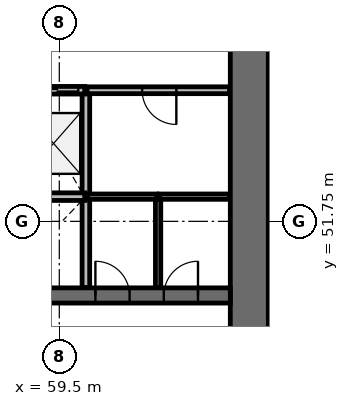
"""IFC4 building model, lengths in metres.
Left out: names, types, materials, properties, quantities, classifications, styles, units other than length and angle.
Written with IfcOpenShell. Run it as: python <this file> out.ifc"""

import sys

from ifc_helpers import new_model, si_unit, direction, frame, frame_2d, origin, place, context, subcontext, project, spatial, rectangle, extrude, source, transform, mapped, element, fill, save


model = new_model("IFC4")
c1 = context("Model", 3, precision=1e-05, world=origin(), true_north=direction((0.0, 1.0)))
c2 = subcontext(c1, "Body", "Model", "MODEL_VIEW")
j1 = project(units=[si_unit("LENGTHUNIT", "METRE"), si_unit("PLANEANGLEUNIT", "RADIAN")], contexts=[c1])
p1 = place(None, origin())
s1 = spatial("IfcSite", under=j1, at=p1, CompositionType="ELEMENT")
p2 = place(p1, origin())
s2 = spatial("IfcBuilding", under=s1, at=p2, CompositionType="ELEMENT")
p3 = place(p2, frame((0.0, 0.0, 9.4)))
s3 = spatial("IfcBuildingStorey", under=s2, at=p3, CompositionType="ELEMENT", Elevation=9.4)
p4 = place(p3, frame((64.5, 38.0, 0.0), z_axis=(0.0, 0.0, 1.0), x_axis=(0.0, 1.0, 0.0)))
e1 = element("IfcWall", 1, at=p4, inside=s3, PredefinedType="SHEAR", context=c2, shape_type="SweptSolid", body=[
    extrude(rectangle(XDim=20.0, YDim=1.0, at=frame_2d((10.0, 0.0))), origin(), (0.0, 0.0, 1.0), 4.4),
])
p5 = place(p4, frame((9.1, 0.0, 0.0)))
e2 = element("IfcOpeningElement", 2, at=p5, cuts=e1, PredefinedType="OPENING", context=c2, shape_type="SweptSolid", body=[
    extrude(rectangle(XDim=1.8, YDim=2.1, at=frame_2d((0.9, 1.05))), frame((0.0, 0.51, 0.0), z_axis=(0.0, -1.0, 0.0), x_axis=(1.0, 0.0, 0.0)), (0.0, 0.0, 1.0), 1.02),
])
p6 = place(p3, frame((40.0, 49.8, 0.0), z_axis=(0.0, 0.0, 1.0), x_axis=(1.0, 0.0, 0.0)))
e3 = element("IfcWall", 3, at=p6, inside=s3, PredefinedType="SHEAR", context=c2, shape_type="SweptSolid", body=[
    extrude(rectangle(XDim=24.0, YDim=0.4, at=frame_2d((12.0, 0.0))), origin(), (0.0, 0.0, 1.0), 4.4),
])
p7 = place(p6, frame((4.5, 0.0, 0.0)))
e4 = element("IfcOpeningElement", 4, at=p7, cuts=e3, PredefinedType="OPENING", context=c2, shape_type="SweptSolid", body=[
    extrude(rectangle(XDim=1.1, YDim=2.1, at=frame_2d((0.55, 1.05))), frame((0.0, 0.21, 0.0), z_axis=(0.0, -1.0, 0.0), x_axis=(1.0, 0.0, 0.0)), (0.0, 0.0, 1.0), 0.42),
])
p8 = place(p6, frame((7.0, 0.0, 0.0)))
e5 = element("IfcOpeningElement", 5, at=p8, cuts=e3, PredefinedType="OPENING", context=c2, shape_type="SweptSolid", body=[
    extrude(rectangle(XDim=1.1, YDim=2.1, at=frame_2d((0.55, 1.05))), frame((0.0, 0.21, 0.0), z_axis=(0.0, -1.0, 0.0), x_axis=(1.0, 0.0, 0.0)), (0.0, 0.0, 1.0), 0.42),
])
p9 = place(p6, frame((9.5, 0.0, 0.0)))
e6 = element("IfcOpeningElement", 6, at=p9, cuts=e3, PredefinedType="OPENING", context=c2, shape_type="SweptSolid", body=[
    extrude(rectangle(XDim=1.1, YDim=2.1, at=frame_2d((0.55, 1.05))), frame((0.0, 0.21, 0.0), z_axis=(0.0, -1.0, 0.0), x_axis=(1.0, 0.0, 0.0)), (0.0, 0.0, 1.0), 0.42),
])
p10 = place(p6, frame((0.9, 0.0, 0.0)))
e7 = element("IfcOpeningElement", 7, at=p10, cuts=e3, PredefinedType="OPENING", context=c2, shape_type="SweptSolid", body=[
    extrude(rectangle(XDim=1.8, YDim=2.4, at=frame_2d((0.9, 1.2))), frame((0.0, 0.21, 0.0), z_axis=(0.0, -1.0, 0.0), x_axis=(1.0, 0.0, 0.0)), (0.0, 0.0, 1.0), 0.42),
])
p11 = place(p6, frame((20.45, 0.0, 0.0)))
e8 = element("IfcOpeningElement", 8, at=p11, cuts=e3, PredefinedType="OPENING", context=c2, shape_type="SweptSolid", body=[
    extrude(rectangle(XDim=0.9, YDim=2.1, at=frame_2d((0.45, 1.05))), frame((0.0, 0.21, 0.0), z_axis=(0.0, -1.0, 0.0), x_axis=(1.0, 0.0, 0.0)), (0.0, 0.0, 1.0), 0.42),
])
p12 = place(p6, frame((22.25, 0.0, 0.0)))
e9 = element("IfcOpeningElement", 9, at=p12, cuts=e3, PredefinedType="OPENING", context=c2, shape_type="SweptSolid", body=[
    extrude(rectangle(XDim=0.9, YDim=2.1, at=frame_2d((0.45, 1.05))), frame((0.0, 0.21, 0.0), z_axis=(0.0, -1.0, 0.0), x_axis=(1.0, 0.0, 0.0)), (0.0, 0.0, 1.0), 0.42),
])
p13 = place(p6, frame((11.65, 0.0, 0.0)))
e10 = element("IfcOpeningElement", 10, at=p13, cuts=e3, PredefinedType="OPENING", context=c2, shape_type="SweptSolid", body=[
    extrude(rectangle(XDim=0.9, YDim=2.1, at=frame_2d((0.45, 1.05))), frame((0.0, 0.21, 0.0), z_axis=(0.0, -1.0, 0.0), x_axis=(1.0, 0.0, 0.0)), (0.0, 0.0, 1.0), 0.42),
])
p14 = place(p3, frame((60.2, 52.4, 0.0), z_axis=(0.0, 0.0, 1.0), x_axis=(0.0, 1.0, 0.0)))
e11 = element("IfcWall", 11, at=p14, inside=s3, PredefinedType="SOLIDWALL", context=c2, shape_type="SweptSolid", body=[
    extrude(rectangle(XDim=2.8, YDim=0.2, at=frame_2d((1.4, 0.0))), origin(), (0.0, 0.0, 1.0), 3.95),
])
p15 = place(p3, frame((60.2, 50.01, 0.0), z_axis=(0.0, 0.0, 1.0), x_axis=(0.0, 1.0, 0.0)))
e12 = element("IfcWall", 12, at=p15, inside=s3, PredefinedType="SOLIDWALL", context=c2, shape_type="SweptSolid", body=[
    extrude(rectangle(XDim=2.36, YDim=0.2, at=frame_2d((1.18, 0.0))), origin(), (0.0, 0.0, 1.0), 3.95),
])
p16 = place(p3, frame((60.17, 52.4, 0.0), z_axis=(0.0, 0.0, 1.0), x_axis=(-1.0, 0.0, 0.0)))
e13 = element("IfcWall", 13, at=p16, inside=s3, PredefinedType="SOLIDWALL", context=c2, shape_type="SweptSolid", body=[
    extrude(rectangle(XDim=1.64, YDim=0.2, at=frame_2d((0.82, 0.0))), origin(), (0.0, 0.0, 1.0), 3.95),
])
p17 = place(p3, frame((60.17, 55.2, 0.0), z_axis=(0.0, 0.0, 1.0), x_axis=(-1.0, 0.0, 0.0)))
e14 = element("IfcWall", 14, at=p17, inside=s3, PredefinedType="SOLIDWALL", context=c2, shape_type="SweptSolid", body=[
    extrude(rectangle(XDim=1.64, YDim=0.2, at=frame_2d((0.82, 0.0))), origin(), (0.0, 0.0, 1.0), 3.95),
])
p18 = place(p17, frame((0.17, 0.0, 0.0)))
e15 = element("IfcOpeningElement", 15, at=p18, cuts=e14, PredefinedType="OPENING", context=c2, shape_type="SweptSolid", body=[
    extrude(rectangle(XDim=1.1, YDim=2.1, at=frame_2d((0.55, 1.05))), frame((0.0, 0.11, 0.0), z_axis=(0.0, -1.0, 0.0), x_axis=(1.0, 0.0, 0.0)), (0.0, 0.0, 1.0), 0.22),
])
p19 = place(p3, frame((63.98, 55.2, 0.0), z_axis=(0.0, 0.0, 1.0), x_axis=(-1.0, 0.0, 0.0)))
e16 = element("IfcWall", 16, at=p19, inside=s3, PredefinedType="PARTITIONING", context=c2, shape_type="SweptSolid", body=[
    extrude(rectangle(XDim=3.75, YDim=0.18, at=frame_2d((1.875, 0.0))), origin(), (0.0, 0.0, 1.0), 3.95),
])
p20 = place(p19, frame((1.4, 0.0, 0.0)))
e17 = element("IfcOpeningElement", 17, at=p20, cuts=e16, PredefinedType="OPENING", context=c2, shape_type="SweptSolid", body=[
    extrude(rectangle(XDim=0.9, YDim=2.1, at=frame_2d((0.45, 1.05))), frame((0.0, 0.1, 0.0), z_axis=(0.0, -1.0, 0.0), x_axis=(1.0, 0.0, 0.0)), (0.0, 0.0, 1.0), 0.2),
])
p21 = place(p3, frame((62.1, 50.01, 0.0), z_axis=(0.0, 0.0, 1.0), x_axis=(0.0, 1.0, 0.0)))
e18 = element("IfcWall", 18, at=p21, inside=s3, PredefinedType="PARTITIONING", context=c2, shape_type="SweptSolid", body=[
    extrude(rectangle(XDim=2.39, YDim=0.14, at=frame_2d((1.195, 0.0))), origin(), (0.0, 0.0, 1.0), 3.15),
])
p22 = place(p3, frame((62.07, 52.4, 0.0), z_axis=(0.0, 0.0, 1.0), x_axis=(-1.0, 0.0, 0.0)))
e19 = element("IfcWall", 19, at=p22, inside=s3, PredefinedType="PARTITIONING", context=c2, shape_type="SweptSolid", body=[
    extrude(rectangle(XDim=1.84, YDim=0.14, at=frame_2d((0.92, 0.0))), origin(), (0.0, 0.0, 1.0), 3.15),
])
p23 = place(p3, frame((63.98, 52.4, 0.0), z_axis=(0.0, 0.0, 1.0), x_axis=(-1.0, 0.0, 0.0)))
e20 = element("IfcWall", 20, at=p23, inside=s3, PredefinedType="PARTITIONING", context=c2, shape_type="SweptSolid", body=[
    extrude(rectangle(XDim=1.85, YDim=0.14, at=frame_2d((0.925, 0.0))), origin(), (0.0, 0.0, 1.0), 3.15),
])
m1 = source(origin(), c2, "Body", "SweptSolid", [
    extrude(rectangle(XDim=1.1, YDim=2.1, at=frame_2d((0.55, 1.05))), frame((0.0, 0.025, 0.0), z_axis=(0.0, -1.0, 0.0), x_axis=(1.0, 0.0, 0.0)), (0.0, 0.0, 1.0), 0.05),
])
p24 = place(p18, origin())
e21 = element("IfcDoor", 21, at=p24, inside=s3, OperationType="DOUBLE_DOOR_SLIDING", PredefinedType="USERDEFINED", context=c2, shape_type="MappedRepresentation", body=[
    mapped(m1, transform((0.0, 0.0, 0.0), scale=1.0)),
])
fill(e15, e21)
m2 = source(origin(), c2, "Body", "SweptSolid", [
    extrude(rectangle(XDim=0.9, YDim=2.1, at=frame_2d((0.45, 1.05))), frame((0.0, 0.025, 0.0), z_axis=(0.0, -1.0, 0.0), x_axis=(1.0, 0.0, 0.0)), (0.0, 0.0, 1.0), 0.05),
])
p25 = place(p11, origin())
e22 = element("IfcDoor", 22, at=p25, inside=s3, OperationType="SINGLE_SWING_LEFT", PredefinedType="DOOR", context=c2, shape_type="MappedRepresentation", body=[
    mapped(m2, transform((0.0, 0.0, 0.0), scale=1.0)),
])
fill(e8, e22)
p26 = place(p12, origin())
e23 = element("IfcDoor", 23, at=p26, inside=s3, OperationType="SINGLE_SWING_RIGHT", PredefinedType="DOOR", context=c2, shape_type="MappedRepresentation", body=[
    mapped(m2, transform((0.0, 0.0, 0.0), scale=1.0)),
])
fill(e9, e23)
p27 = place(p20, origin())
e24 = element("IfcDoor", 24, at=p27, inside=s3, OperationType="SINGLE_SWING_LEFT", PredefinedType="DOOR", context=c2, shape_type="MappedRepresentation", body=[
    mapped(m2, transform((0.0, 0.0, 0.0), scale=1.0)),
])
fill(e17, e24)
save(model, sys.argv[1])
